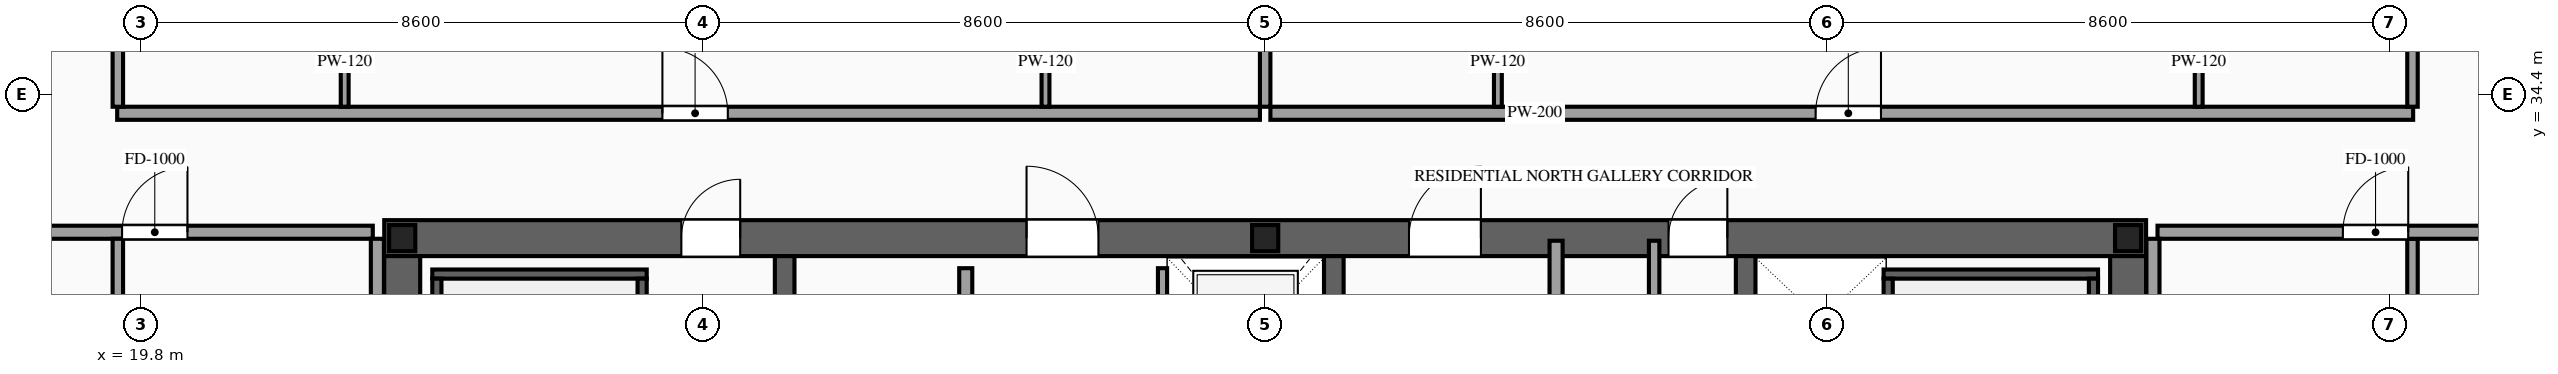
"""IFC4 building model, lengths in metres.
Left out: names, types, materials, properties, quantities, classifications, styles, units other than length and angle.
Written with IfcOpenShell. Run it as: python <this file> out.ifc"""

import sys

from ifc_helpers import new_model, si_unit, direction, frame, frame_2d, origin, origin_2d, place, context, subcontext, project, spatial, rectangle, i_section, extrude, source, transform, mapped, element, fill, save


model = new_model("IFC4")
c1 = context("Model", 3, precision=1e-05, world=origin(), true_north=direction((0.0, 1.0)))
c2 = subcontext(c1, "Body", "Model", "MODEL_VIEW")
j1 = project(units=[si_unit("LENGTHUNIT", "METRE"), si_unit("PLANEANGLEUNIT", "RADIAN")], contexts=[c1])
p1 = place(None, origin())
s1 = spatial("IfcSite", under=j1, at=p1, CompositionType="ELEMENT")
p2 = place(p1, origin())
s2 = spatial("IfcBuilding", under=s1, at=p2, CompositionType="ELEMENT")
p3 = place(p2, frame((0.0, 0.0, 227.6)))
s3 = spatial("IfcBuildingStorey", under=s2, at=p3, CompositionType="ELEMENT", Elevation=227.6)
p4 = place(p3, frame((23.525, 32.2, 0.0), z_axis=(0.0, 0.0, 1.0), x_axis=(1.0, 0.0, 0.0)))
e1 = element("IfcWall", 1, at=p4, inside=s3, PredefinedType="SHEAR", context=c2, shape_type="SweptSolid", body=[
    extrude(rectangle(XDim=26.95, YDim=0.55, at=frame_2d((13.475, 0.0))), origin(), (0.0, 0.0, 1.0), 3.5),
])
p5 = place(p4, frame((4.545, 0.0, 0.0)))
e2 = element("IfcOpeningElement", 2, at=p5, cuts=e1, PredefinedType="OPENING", context=c2, shape_type="SweptSolid", body=[
    extrude(rectangle(XDim=0.9, YDim=2.15, at=frame_2d((0.45, 1.075))), frame((0.0, 0.29, 0.0), z_axis=(0.0, -1.0, 0.0), x_axis=(1.0, 0.0, 0.0)), (0.0, 0.0, 1.0), 0.58),
])
p6 = place(p4, frame((9.825, 0.0, 0.0)))
e3 = element("IfcOpeningElement", 3, at=p6, cuts=e1, PredefinedType="OPENING", context=c2, shape_type="SweptSolid", body=[
    extrude(rectangle(XDim=1.1, YDim=2.2, at=frame_2d((0.55, 1.1))), frame((0.0, 0.29, 0.0), z_axis=(0.0, -1.0, 0.0), x_axis=(1.0, 0.0, 0.0)), (0.0, 0.0, 1.0), 0.58),
])
p7 = place(p4, frame((15.675, 0.0, 0.0)))
e4 = element("IfcOpeningElement", 4, at=p7, cuts=e1, PredefinedType="OPENING", context=c2, shape_type="SweptSolid", body=[
    extrude(rectangle(XDim=1.1, YDim=2.2, at=frame_2d((0.55, 1.1))), frame((0.0, 0.29, 0.0), z_axis=(0.0, -1.0, 0.0), x_axis=(1.0, 0.0, 0.0)), (0.0, 0.0, 1.0), 0.58),
])
p8 = place(p4, frame((19.645, 0.0, 0.0)))
e5 = element("IfcOpeningElement", 5, at=p8, cuts=e1, PredefinedType="OPENING", context=c2, shape_type="SweptSolid", body=[
    extrude(rectangle(XDim=0.9, YDim=2.15, at=frame_2d((0.45, 1.075))), frame((0.0, 0.29, 0.0), z_axis=(0.0, -1.0, 0.0), x_axis=(1.0, 0.0, 0.0)), (0.0, 0.0, 1.0), 0.58),
])
m1 = source(origin(), c2, "Body", "SweptSolid", [
    extrude(rectangle(XDim=12.25, YDim=0.55, at=frame_2d((6.125, 0.0))), origin(), (0.0, 0.0, 1.0), 3.5),
])
for number, where, z_axis, x_axis in (
    (6, (23.8, 19.675, 0.0), (0.0, 0.0, 1.0), (0.0, 1.0, 0.0)),
    (7, (50.2, 19.675, 0.0), (0.0, 0.0, 1.0), (0.0, 1.0, 0.0)),
):
    element("IfcWall", number, at=place(p3, frame(where, z_axis=z_axis, x_axis=x_axis)), inside=s3, PredefinedType="SHEAR", context=c2, shape_type="MappedRepresentation", body=[
        mapped(m1, transform((0.0, 0.0, 0.0), scale=1.0)),
    ])
m2 = source(origin(), c2, "Body", "SweptSolid", [
    extrude(rectangle(XDim=12.25, YDim=0.3, at=frame_2d((6.125, 0.0))), origin(), (0.0, 0.0, 1.0), 3.5),
])
for number, where, z_axis, x_axis in (
    (8, (29.65, 19.675, 0.0), (0.0, 0.0, 1.0), (0.0, 1.0, 0.0)),
    (9, (38.05, 19.675, 0.0), (0.0, 0.0, 1.0), (0.0, 1.0, 0.0)),
    (10, (44.35, 19.675, 0.0), (0.0, 0.0, 1.0), (0.0, 1.0, 0.0)),
):
    element("IfcWall", number, at=place(p3, frame(where, z_axis=z_axis, x_axis=x_axis)), inside=s3, PredefinedType="SOLIDWALL", context=c2, shape_type="MappedRepresentation", body=[
        mapped(m2, transform((0.0, 0.0, 0.0), scale=1.0)),
    ])
m3 = source(origin(), c2, "Body", "SweptSolid", [
    extrude(i_section(OverallWidth=0.4, OverallDepth=0.4, WebThickness=0.013, FlangeThickness=0.021, at=origin_2d()), origin(), (0.0, 0.0, 1.0), 3.5),
])
for number, where, z_axis, x_axis in (
    (11, (23.8, 32.2, 0.0), (0.0, 0.0, 1.0), (1.0, 0.0, 0.0)),
    (12, (37.0, 32.2, 0.0), (0.0, 0.0, 1.0), (1.0, 0.0, 0.0)),
    (13, (50.2, 32.2, 0.0), (0.0, 0.0, 1.0), (1.0, 0.0, 0.0)),
):
    element("IfcColumn", number, at=place(p3, frame(where, z_axis=z_axis, x_axis=x_axis)), inside=s3, PredefinedType="COLUMN", context=c2, shape_type="MappedRepresentation", body=[
        mapped(m3, transform((0.0, 0.0, 0.0), scale=1.0)),
    ])
p9 = place(p3, frame((35.43, 29.4, 0.0), z_axis=(0.0, 0.0, 1.0), x_axis=(0.0, 1.0, 0.0)))
e14 = element("IfcWall", 14, at=p9, inside=s3, PredefinedType="SOLIDWALL", context=c2, shape_type="SweptSolid", body=[
    extrude(rectangle(XDim=2.34, YDim=0.14, at=frame_2d((1.17, 0.0))), origin(), (0.0, 0.0, 1.0), 3.28),
])
p10 = place(p9, frame((0.62, 0.0, 0.0)))
e15 = element("IfcOpeningElement", 15, at=p10, cuts=e14, PredefinedType="OPENING", context=c2, shape_type="SweptSolid", body=[
    extrude(rectangle(XDim=1.1, YDim=2.2, at=frame_2d((0.55, 1.1))), frame((0.0, 0.085, 0.0), z_axis=(0.0, -1.0, 0.0), x_axis=(1.0, 0.0, 0.0)), (0.0, 0.0, 1.0), 0.17),
])
m4 = source(origin(), c2, "Body", "SweptSolid", [
    extrude(rectangle(XDim=3.28, YDim=0.14, at=frame_2d((1.64, 0.0))), origin(), (0.0, 0.0, 1.0), 3.28),
])
p11 = place(p3, frame((24.26, 31.65, 0.0), z_axis=(0.0, 0.0, 1.0), x_axis=(1.0, 0.0, 0.0)))
e16 = element("IfcWall", 16, at=p11, inside=s3, PredefinedType="SOLIDWALL", context=c2, shape_type="MappedRepresentation", body=[
    mapped(m4, transform((0.0, 0.0, 0.0), scale=1.0)),
])
m5 = source(origin(), c2, "Body", "SweptSolid", [
    extrude(rectangle(XDim=8.94, YDim=0.14, at=frame_2d((4.47, 0.0))), origin(), (0.0, 0.0, 1.0), 3.28),
])
for number, where, z_axis, x_axis in (
    (17, (24.33, 22.64, 0.0), (0.0, 0.0, 1.0), (0.0, 1.0, 0.0)),
    (18, (27.47, 22.64, 0.0), (0.0, 0.0, 1.0), (0.0, 1.0, 0.0)),
):
    element("IfcWall", number, at=place(p3, frame(where, z_axis=z_axis, x_axis=x_axis)), inside=s3, PredefinedType="SOLIDWALL", context=c2, shape_type="MappedRepresentation", body=[
        mapped(m5, transform((0.0, 0.0, 0.0), scale=1.0)),
    ])
p12 = place(p3, frame((46.46, 31.65, 0.0), z_axis=(0.0, 0.0, 1.0), x_axis=(1.0, 0.0, 0.0)))
e19 = element("IfcWall", 19, at=p12, inside=s3, PredefinedType="SOLIDWALL", context=c2, shape_type="MappedRepresentation", body=[
    mapped(m4, transform((0.0, 0.0, 0.0), scale=1.0)),
])
for number, where, z_axis, x_axis in (
    (20, (46.53, 22.64, 0.0), (0.0, 0.0, 1.0), (0.0, 1.0, 0.0)),
    (21, (49.67, 22.64, 0.0), (0.0, 0.0, 1.0), (0.0, 1.0, 0.0)),
):
    element("IfcWall", number, at=place(p3, frame(where, z_axis=z_axis, x_axis=x_axis)), inside=s3, PredefinedType="SOLIDWALL", context=c2, shape_type="MappedRepresentation", body=[
        mapped(m5, transform((0.0, 0.0, 0.0), scale=1.0)),
    ])
p13 = place(p3, frame((32.42, 25.92, 0.0), z_axis=(0.0, 0.0, 1.0), x_axis=(0.0, 1.0, 0.0)))
e22 = element("IfcWall", 22, at=p13, inside=s3, PredefinedType="PARTITIONING", context=c2, shape_type="SweptSolid", body=[
    extrude(rectangle(XDim=5.82, YDim=0.2, at=frame_2d((2.91, 0.0))), origin(), (0.0, 0.0, 1.0), 3.28),
])
p14 = place(p13, frame((2.46, 0.0, 0.0)))
e23 = element("IfcOpeningElement", 23, at=p14, cuts=e22, PredefinedType="OPENING", context=c2, shape_type="SweptSolid", body=[
    extrude(rectangle(XDim=0.9, YDim=2.15, at=frame_2d((0.45, 1.075))), frame((0.0, 0.115, 0.0), z_axis=(0.0, -1.0, 0.0), x_axis=(1.0, 0.0, 0.0)), (0.0, 0.0, 1.0), 0.23),
])
m6 = source(origin(), c2, "Body", "SweptSolid", [
    extrude(rectangle(XDim=12.72, YDim=0.2, at=frame_2d((6.36, 0.0))), origin(), (0.0, 0.0, 1.0), 3.28),
])
p15 = place(p3, frame((41.45, 19.44, 0.0), z_axis=(0.0, 0.0, 1.0), x_axis=(0.0, 1.0, 0.0)))
e24 = element("IfcWall", 24, at=p15, inside=s3, PredefinedType="PARTITIONING", context=c2, shape_type="MappedRepresentation", body=[
    mapped(m6, transform((0.0, 0.0, 0.0), scale=1.0)),
])
m7 = source(origin(), c2, "Body", "SweptSolid", [
    extrude(rectangle(XDim=10.72, YDim=0.16, at=frame_2d((5.36, 0.0))), origin(), (0.0, 0.0, 1.0), 3.28),
])
p16 = place(p3, frame((42.95, 21.44, 0.0), z_axis=(0.0, 0.0, 1.0), x_axis=(0.0, 1.0, 0.0)))
e25 = element("IfcWall", 25, at=p16, inside=s3, PredefinedType="PARTITIONING", context=c2, shape_type="MappedRepresentation", body=[
    mapped(m7, transform((0.0, 0.0, 0.0), scale=1.0)),
])
p17 = place(p3, frame((19.44, 34.11, 0.0), z_axis=(0.0, 0.0, 1.0), x_axis=(1.0, 0.0, 0.0)))
e26 = element("IfcWall", 26, at=p17, inside=s3, PredefinedType="PARTITIONING", context=c2, shape_type="SweptSolid", body=[
    extrude(rectangle(XDim=17.48, YDim=0.2, at=frame_2d((8.74, 0.0))), origin(), (0.0, 0.0, 1.0), 3.28),
])
p18 = place(p17, frame((8.34, 0.0, 0.0)))
e27 = element("IfcOpeningElement", 27, at=p18, cuts=e26, PredefinedType="OPENING", context=c2, shape_type="SweptSolid", body=[
    extrude(rectangle(XDim=1.0, YDim=2.2, at=frame_2d((0.5, 1.1))), frame((0.0, 0.115, 0.0), z_axis=(0.0, -1.0, 0.0), x_axis=(1.0, 0.0, 0.0)), (0.0, 0.0, 1.0), 0.23),
])
m8 = source(origin(), c2, "Body", "SweptSolid", [
    extrude(rectangle(XDim=12.04, YDim=0.16, at=frame_2d((6.02, 0.0))), origin(), (0.0, 0.0, 1.0), 2.787),
])
p19 = place(p3, frame((37.0, 34.21, 0.0), z_axis=(0.0, 0.0, 1.0), x_axis=(0.0, 1.0, 0.0)))
e28 = element("IfcWall", 28, at=p19, inside=s3, PredefinedType="PARTITIONING", context=c2, shape_type="MappedRepresentation", body=[
    mapped(m8, transform((0.0, 0.0, 0.0), scale=1.0)),
])
p20 = place(p3, frame((22.92, 34.21, 0.0), z_axis=(0.0, 0.0, 1.0), x_axis=(0.0, 1.0, 0.0)))
e29 = element("IfcWall", 29, at=p20, inside=s3, PredefinedType="PARTITIONING", context=c2, shape_type="SweptSolid", body=[
    extrude(rectangle(XDim=4.11, YDim=0.12, at=frame_2d((2.055, 0.0))), origin(), (0.0, 0.0, 1.0), 3.28),
])
p21 = place(p20, frame((1.63, 0.0, 0.0)))
e30 = element("IfcOpeningElement", 30, at=p21, cuts=e29, PredefinedType="OPENING", context=c2, shape_type="SweptSolid", body=[
    extrude(rectangle(XDim=0.85, YDim=2.1, at=frame_2d((0.425, 1.05))), frame((0.0, 0.075, 0.0), z_axis=(0.0, -1.0, 0.0), x_axis=(1.0, 0.0, 0.0)), (0.0, 0.0, 1.0), 0.15),
])
p22 = place(p3, frame((33.64, 34.21, 0.0), z_axis=(0.0, 0.0, 1.0), x_axis=(0.0, 1.0, 0.0)))
e31 = element("IfcWall", 31, at=p22, inside=s3, PredefinedType="PARTITIONING", context=c2, shape_type="SweptSolid", body=[
    extrude(rectangle(XDim=4.11, YDim=0.12, at=frame_2d((2.055, 0.0))), origin(), (0.0, 0.0, 1.0), 3.28),
])
p23 = place(p22, frame((1.63, 0.0, 0.0)))
e32 = element("IfcOpeningElement", 32, at=p23, cuts=e31, PredefinedType="OPENING", context=c2, shape_type="SweptSolid", body=[
    extrude(rectangle(XDim=0.85, YDim=2.1, at=frame_2d((0.425, 1.05))), frame((0.0, 0.075, 0.0), z_axis=(0.0, -1.0, 0.0), x_axis=(1.0, 0.0, 0.0)), (0.0, 0.0, 1.0), 0.15),
])
p24 = place(p3, frame((37.08, 34.11, 0.0), z_axis=(0.0, 0.0, 1.0), x_axis=(1.0, 0.0, 0.0)))
e33 = element("IfcWall", 33, at=p24, inside=s3, PredefinedType="PARTITIONING", context=c2, shape_type="SweptSolid", body=[
    extrude(rectangle(XDim=17.48, YDim=0.2, at=frame_2d((8.74, 0.0))), origin(), (0.0, 0.0, 1.0), 3.28),
])
p25 = place(p24, frame((8.34, 0.0, 0.0)))
e34 = element("IfcOpeningElement", 34, at=p25, cuts=e33, PredefinedType="OPENING", context=c2, shape_type="SweptSolid", body=[
    extrude(rectangle(XDim=1.0, YDim=2.2, at=frame_2d((0.5, 1.1))), frame((0.0, 0.115, 0.0), z_axis=(0.0, -1.0, 0.0), x_axis=(1.0, 0.0, 0.0)), (0.0, 0.0, 1.0), 0.23),
])
m9 = source(origin(), c2, "Body", "SweptSolid", [
    extrude(rectangle(XDim=11.89, YDim=0.16, at=frame_2d((5.945, 0.0))), origin(), (0.0, 0.0, 1.0), 3.28),
])
for number, where, z_axis, x_axis in (
    (35, (19.45, 34.21, 0.0), (0.0, 0.0, 1.0), (0.0, 1.0, 0.0)),
    (36, (54.55, 34.21, 0.0), (0.0, 0.0, 1.0), (0.0, 1.0, 0.0)),
):
    element("IfcWall", number, at=place(p3, frame(where, z_axis=z_axis, x_axis=x_axis)), inside=s3, PredefinedType="PARTITIONING", context=c2, shape_type="MappedRepresentation", body=[
        mapped(m9, transform((0.0, 0.0, 0.0), scale=1.0)),
    ])
p26 = place(p3, frame((40.56, 34.21, 0.0), z_axis=(0.0, 0.0, 1.0), x_axis=(0.0, 1.0, 0.0)))
e37 = element("IfcWall", 37, at=p26, inside=s3, PredefinedType="PARTITIONING", context=c2, shape_type="SweptSolid", body=[
    extrude(rectangle(XDim=4.11, YDim=0.12, at=frame_2d((2.055, 0.0))), origin(), (0.0, 0.0, 1.0), 3.28),
])
p27 = place(p26, frame((1.63, 0.0, 0.0)))
e38 = element("IfcOpeningElement", 38, at=p27, cuts=e37, PredefinedType="OPENING", context=c2, shape_type="SweptSolid", body=[
    extrude(rectangle(XDim=0.85, YDim=2.1, at=frame_2d((0.425, 1.05))), frame((0.0, 0.075, 0.0), z_axis=(0.0, -1.0, 0.0), x_axis=(1.0, 0.0, 0.0)), (0.0, 0.0, 1.0), 0.15),
])
p28 = place(p3, frame((51.28, 34.21, 0.0), z_axis=(0.0, 0.0, 1.0), x_axis=(0.0, 1.0, 0.0)))
e39 = element("IfcWall", 39, at=p28, inside=s3, PredefinedType="PARTITIONING", context=c2, shape_type="SweptSolid", body=[
    extrude(rectangle(XDim=4.11, YDim=0.12, at=frame_2d((2.055, 0.0))), origin(), (0.0, 0.0, 1.0), 3.28),
])
p29 = place(p28, frame((1.63, 0.0, 0.0)))
e40 = element("IfcOpeningElement", 40, at=p29, cuts=e39, PredefinedType="OPENING", context=c2, shape_type="SweptSolid", body=[
    extrude(rectangle(XDim=0.85, YDim=2.1, at=frame_2d((0.425, 1.05))), frame((0.0, 0.075, 0.0), z_axis=(0.0, -1.0, 0.0), x_axis=(1.0, 0.0, 0.0)), (0.0, 0.0, 1.0), 0.15),
])
p30 = place(p3, frame((16.55, 32.29, 0.0), z_axis=(0.0, 0.0, 1.0), x_axis=(1.0, 0.0, 0.0)))
e41 = element("IfcWall", 41, at=p30, inside=s3, PredefinedType="PARTITIONING", context=c2, shape_type="SweptSolid", body=[
    extrude(rectangle(XDim=6.8, YDim=0.2, at=frame_2d((3.4, 0.0))), origin(), (0.0, 0.0, 1.0), 2.825),
])
p31 = place(p30, frame((2.965, 0.0, 0.0)))
e42 = element("IfcOpeningElement", 42, at=p31, cuts=e41, PredefinedType="OPENING", context=c2, shape_type="SweptSolid", body=[
    extrude(rectangle(XDim=1.0, YDim=2.2, at=frame_2d((0.5, 1.1))), frame((0.0, 0.115, 0.0), z_axis=(0.0, -1.0, 0.0), x_axis=(1.0, 0.0, 0.0)), (0.0, 0.0, 1.0), 0.23),
])
m10 = source(origin(), c2, "Body", "SweptSolid", [
    extrude(rectangle(XDim=26.69, YDim=0.16, at=frame_2d((13.345, 0.0))), origin(), (0.0, 0.0, 1.0), 3.28),
])
for number, where, z_axis, x_axis in (
    (43, (19.45, 5.5, 0.0), (0.0, 0.0, 1.0), (0.0, 1.0, 0.0)),
    (44, (54.55, 5.5, 0.0), (0.0, 0.0, 1.0), (0.0, 1.0, 0.0)),
):
    element("IfcWall", number, at=place(p3, frame(where, z_axis=z_axis, x_axis=x_axis)), inside=s3, PredefinedType="PARTITIONING", context=c2, shape_type="MappedRepresentation", body=[
        mapped(m10, transform((0.0, 0.0, 0.0), scale=1.0)),
    ])
m11 = source(origin(), c2, "Body", "SweptSolid", [
    extrude(rectangle(XDim=6.29, YDim=0.2, at=frame_2d((3.145, 0.0))), origin(), (0.0, 0.0, 1.0), 3.28),
])
p32 = place(p3, frame((23.42, 25.9, 0.0), z_axis=(0.0, 0.0, 1.0), x_axis=(0.0, 1.0, 0.0)))
e45 = element("IfcWall", 45, at=p32, inside=s3, PredefinedType="PARTITIONING", context=c2, shape_type="MappedRepresentation", body=[
    mapped(m11, transform((0.0, 0.0, 0.0), scale=1.0)),
])
p33 = place(p3, frame((50.65, 32.29, 0.0), z_axis=(0.0, 0.0, 1.0), x_axis=(1.0, 0.0, 0.0)))
e46 = element("IfcWall", 46, at=p33, inside=s3, PredefinedType="PARTITIONING", context=c2, shape_type="SweptSolid", body=[
    extrude(rectangle(XDim=6.8, YDim=0.2, at=frame_2d((3.4, 0.0))), origin(), (0.0, 0.0, 1.0), 2.825),
])
p34 = place(p33, frame((2.835, 0.0, 0.0)))
e47 = element("IfcOpeningElement", 47, at=p34, cuts=e46, PredefinedType="OPENING", context=c2, shape_type="SweptSolid", body=[
    extrude(rectangle(XDim=1.0, YDim=2.2, at=frame_2d((0.5, 1.1))), frame((0.0, 0.115, 0.0), z_axis=(0.0, -1.0, 0.0), x_axis=(1.0, 0.0, 0.0)), (0.0, 0.0, 1.0), 0.23),
])
p35 = place(p3, frame((50.58, 25.9, 0.0), z_axis=(0.0, 0.0, 1.0), x_axis=(0.0, 1.0, 0.0)))
e48 = element("IfcWall", 48, at=p35, inside=s3, PredefinedType="PARTITIONING", context=c2, shape_type="MappedRepresentation", body=[
    mapped(m11, transform((0.0, 0.0, 0.0), scale=1.0)),
])
m12 = source(origin(), c2, "Body", "SweptSolid", [
    extrude(rectangle(XDim=0.9, YDim=2.15, at=frame_2d((0.45, 1.075))), frame((0.0, 0.025, 0.0), z_axis=(0.0, -1.0, 0.0), x_axis=(1.0, 0.0, 0.0)), (0.0, 0.0, 1.0), 0.05),
])
p36 = place(p5, origin())
e49 = element("IfcDoor", 49, at=p36, inside=s3, OperationType="SINGLE_SWING_RIGHT", PredefinedType="DOOR", context=c2, shape_type="MappedRepresentation", body=[
    mapped(m12, transform((0.0, 0.0, 0.0), scale=1.0)),
])
fill(e2, e49)
m13 = source(origin(), c2, "Body", "SweptSolid", [
    extrude(rectangle(XDim=1.1, YDim=2.2, at=frame_2d((0.55, 1.1))), frame((0.0, 0.025, 0.0), z_axis=(0.0, -1.0, 0.0), x_axis=(1.0, 0.0, 0.0)), (0.0, 0.0, 1.0), 0.05),
])
p37 = place(p6, origin())
e50 = element("IfcDoor", 50, at=p37, inside=s3, OperationType="SINGLE_SWING_LEFT", PredefinedType="DOOR", context=c2, shape_type="MappedRepresentation", body=[
    mapped(m13, transform((0.0, 0.0, 0.0), scale=1.0)),
])
fill(e3, e50)
p38 = place(p7, origin())
e51 = element("IfcDoor", 51, at=p38, inside=s3, OperationType="SINGLE_SWING_RIGHT", PredefinedType="DOOR", context=c2, shape_type="MappedRepresentation", body=[
    mapped(m13, transform((0.0, 0.0, 0.0), scale=1.0)),
])
fill(e4, e51)
p39 = place(p8, origin())
e52 = element("IfcDoor", 52, at=p39, inside=s3, OperationType="SINGLE_SWING_RIGHT", PredefinedType="DOOR", context=c2, shape_type="MappedRepresentation", body=[
    mapped(m12, transform((0.0, 0.0, 0.0), scale=1.0)),
])
fill(e5, e52)
m14 = source(origin(), c2, "Body", "SweptSolid", [
    extrude(rectangle(XDim=1.0, YDim=2.2, at=frame_2d((0.5, 1.1))), frame((0.0, 0.025, 0.0), z_axis=(0.0, -1.0, 0.0), x_axis=(1.0, 0.0, 0.0)), (0.0, 0.0, 1.0), 0.05),
])
p40 = place(p18, origin())
e53 = element("IfcDoor", 53, at=p40, inside=s3, OperationType="SINGLE_SWING_LEFT", PredefinedType="DOOR", context=c2, shape_type="MappedRepresentation", body=[
    mapped(m14, transform((0.0, 0.0, 0.0), scale=1.0)),
])
fill(e27, e53)
p41 = place(p25, origin())
e54 = element("IfcDoor", 54, at=p41, inside=s3, OperationType="SINGLE_SWING_RIGHT", PredefinedType="DOOR", context=c2, shape_type="MappedRepresentation", body=[
    mapped(m14, transform((0.0, 0.0, 0.0), scale=1.0)),
])
fill(e34, e54)
p42 = place(p31, origin())
e55 = element("IfcDoor", 55, at=p42, inside=s3, OperationType="SINGLE_SWING_RIGHT", PredefinedType="DOOR", context=c2, shape_type="MappedRepresentation", body=[
    mapped(m14, transform((0.0, 0.0, 0.0), scale=1.0)),
])
fill(e42, e55)
p43 = place(p34, origin())
e56 = element("IfcDoor", 56, at=p43, inside=s3, OperationType="SINGLE_SWING_RIGHT", PredefinedType="DOOR", context=c2, shape_type="MappedRepresentation", body=[
    mapped(m14, transform((0.0, 0.0, 0.0), scale=1.0)),
])
fill(e47, e56)
save(model, sys.argv[1])
